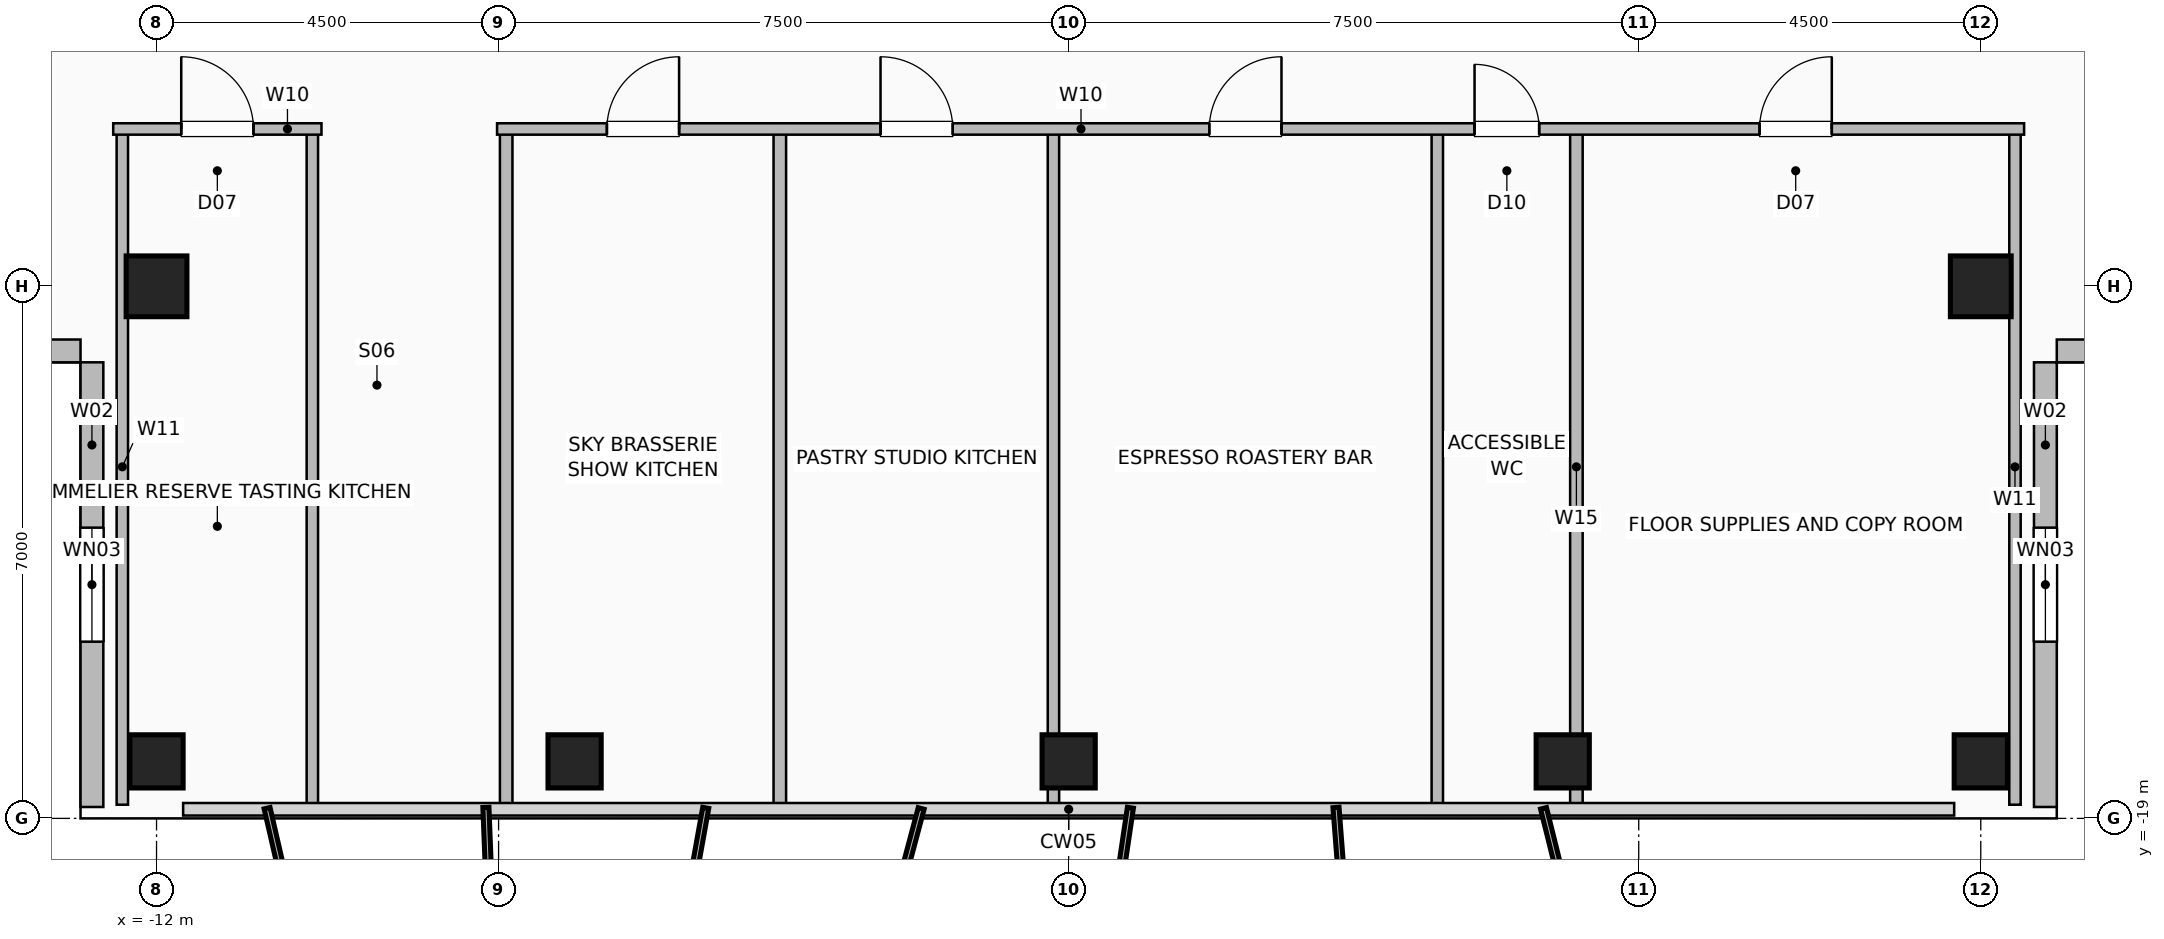
"""IFC4 building model, lengths in metres.
Left out: names, types, materials, properties, quantities, classifications, styles, units other than length and angle.
Written with IfcOpenShell. Run it as: python <this file> out.ifc"""

import sys

from ifc_helpers import new_model, si_unit, direction, frame, frame_2d, origin, origin_2d, place, context, subcontext, project, spatial, rectangle, hollow_rectangle, extrude, element, fill, save


model = new_model("IFC4")
c1 = context("Model", 3, precision=1e-05, world=origin(), true_north=direction((0.0, 1.0)))
c2 = subcontext(c1, "Body", "Model", "MODEL_VIEW")
j1 = project(units=[si_unit("LENGTHUNIT", "METRE"), si_unit("PLANEANGLEUNIT", "RADIAN")], contexts=[c1])
p1 = place(None, origin())
s1 = spatial("IfcSite", under=j1, at=p1, CompositionType="ELEMENT")
p2 = place(p1, origin())
s2 = spatial("IfcBuilding", under=s1, at=p2, CompositionType="ELEMENT")
p3 = place(p2, frame((0.0, 0.0, 293.6)))
s3 = spatial("IfcBuildingStorey", under=s2, at=p3, CompositionType="ELEMENT", Elevation=293.6)
for number, where, z_axis, x_axis in (
    (1, (-12.0, -18.25, 0.0), (0.0, 0.0, 1.0), (1.0, 0.0, 0.0)),
    (2, (-6.5, -18.25, 0.0), (0.0, 0.0, 1.0), (1.0, 0.0, 0.0)),
    (3, (0.0, -18.25, 0.0), (0.0, 0.0, 1.0), (1.0, 0.0, 0.0)),
    (4, (6.5, -18.25, 0.0), (0.0, 0.0, 1.0), (1.0, 0.0, 0.0)),
    (5, (12.0, -18.25, 0.0), (0.0, 0.0, 1.0), (1.0, 0.0, 0.0)),
):
    element("IfcColumn", number, at=place(p3, frame(where, z_axis=z_axis, x_axis=x_axis)), inside=s3, PredefinedType="COLUMN", context=c2, shape_type="SweptSolid", body=[
        extrude(hollow_rectangle(XDim=0.7, YDim=0.7, WallThickness=0.035, at=origin_2d()), origin(), (0.0, 0.0, 1.0), 3.6),
    ])
for number, where, z_axis, x_axis in (
    (6, (-12.0, -12.0, 0.0), (0.0, 0.0, 1.0), (1.0, 0.0, 0.0)),
    (7, (12.0, -12.0, 0.0), (0.0, 0.0, 1.0), (1.0, 0.0, 0.0)),
):
    element("IfcColumn", number, at=place(p3, frame(where, z_axis=z_axis, x_axis=x_axis)), inside=s3, PredefinedType="COLUMN", context=c2, shape_type="SweptSolid", body=[
        extrude(hollow_rectangle(XDim=0.8, YDim=0.8, WallThickness=0.04, at=origin_2d()), origin(), (0.0, 0.0, 1.0), 3.6),
    ])
p4 = place(p3, frame((-12.85, -18.85, 0.0), z_axis=(0.0, 0.0, 1.0), x_axis=(0.0, 1.0, 0.0)))
e8 = element("IfcWall", 8, at=p4, inside=s3, PredefinedType="SOLIDWALL", context=c2, shape_type="SweptSolid", body=[
    extrude(rectangle(XDim=5.85, YDim=0.3, at=frame_2d((2.925, 0.0))), origin(), (0.0, 0.0, 1.0), 3.36),
])
p5 = place(p4, frame((2.175, 0.0, 0.9)))
e9 = element("IfcOpeningElement", 9, at=p5, cuts=e8, PredefinedType="OPENING", context=c2, shape_type="SweptSolid", body=[
    extrude(rectangle(XDim=1.5, YDim=1.8, at=frame_2d((0.75, 0.9))), frame((0.0, 0.16, 0.0), z_axis=(0.0, -1.0, 0.0), x_axis=(1.0, 0.0, 0.0)), (0.0, 0.0, 1.0), 0.32),
])
p6 = place(p3, frame((-18.85, -12.85, 0.0), z_axis=(0.0, 0.0, 1.0), x_axis=(1.0, 0.0, 0.0)))
e10 = element("IfcWall", 10, at=p6, inside=s3, PredefinedType="SOLIDWALL", context=c2, shape_type="SweptSolid", body=[
    extrude(rectangle(XDim=5.85, YDim=0.3, at=frame_2d((2.925, 0.0))), origin(), (0.0, 0.0, 1.0), 3.36),
])
p7 = place(p3, frame((12.85, -18.85, 0.0), z_axis=(0.0, 0.0, 1.0), x_axis=(0.0, 1.0, 0.0)))
e11 = element("IfcWall", 11, at=p7, inside=s3, PredefinedType="SOLIDWALL", context=c2, shape_type="SweptSolid", body=[
    extrude(rectangle(XDim=5.85, YDim=0.3, at=frame_2d((2.925, 0.0))), origin(), (0.0, 0.0, 1.0), 3.36),
])
p8 = place(p7, frame((2.175, 0.0, 0.9)))
e12 = element("IfcOpeningElement", 12, at=p8, cuts=e11, PredefinedType="OPENING", context=c2, shape_type="SweptSolid", body=[
    extrude(rectangle(XDim=1.5, YDim=1.8, at=frame_2d((0.75, 0.9))), frame((0.0, 0.16, 0.0), z_axis=(0.0, -1.0, 0.0), x_axis=(1.0, 0.0, 0.0)), (0.0, 0.0, 1.0), 0.32),
])
p9 = place(p3, frame((18.85, -12.85, 0.0), z_axis=(0.0, 0.0, 1.0), x_axis=(-1.0, 0.0, 0.0)))
e13 = element("IfcWall", 13, at=p9, inside=s3, PredefinedType="SOLIDWALL", context=c2, shape_type="SweptSolid", body=[
    extrude(rectangle(XDim=5.85, YDim=0.3, at=frame_2d((2.925, 0.0))), origin(), (0.0, 0.0, 1.0), 3.36),
])
for number, where, z_axis, x_axis in (
    (14, (-12.45, -18.82, 0.0), (0.0, 0.0, 1.0), (0.0, 1.0, 0.0)),
    (15, (-9.95, -18.82, 0.0), (0.0, 0.0, 1.0), (0.0, 1.0, 0.0)),
):
    element("IfcWall", number, at=place(p3, frame(where, z_axis=z_axis, x_axis=x_axis)), inside=s3, PredefinedType="PARTITIONING", context=c2, shape_type="SweptSolid", body=[
        extrude(rectangle(XDim=8.89, YDim=0.15, at=frame_2d((4.445, 0.0))), origin(), (0.0, 0.0, 1.0), 3.36),
    ])
p10 = place(p3, frame((-12.57, -9.93, 0.0), z_axis=(0.0, 0.0, 1.0), x_axis=(1.0, 0.0, 0.0)))
e16 = element("IfcWall", 16, at=p10, inside=s3, PredefinedType="PARTITIONING", context=c2, shape_type="SweptSolid", body=[
    extrude(rectangle(XDim=2.74, YDim=0.15, at=frame_2d((1.37, 0.0))), origin(), (0.0, 0.0, 1.0), 3.36),
])
p11 = place(p10, frame((0.895, 0.0, 0.0)))
e17 = element("IfcOpeningElement", 17, at=p11, cuts=e16, PredefinedType="OPENING", context=c2, shape_type="SweptSolid", body=[
    extrude(rectangle(XDim=0.95, YDim=2.06, at=frame_2d((0.475, 1.03))), frame((0.0, 0.085, 0.0), z_axis=(0.0, -1.0, 0.0), x_axis=(1.0, 0.0, 0.0)), (0.0, 0.0, 1.0), 0.17),
])
for number, where, z_axis, x_axis in (
    (18, (6.68, -18.82, 0.0), (0.0, 0.0, 1.0), (0.0, 1.0, 0.0)),
    (19, (-7.4, -18.82, 0.0), (0.0, 0.0, 1.0), (0.0, 1.0, 0.0)),
    (20, (-3.8, -18.82, 0.0), (0.0, 0.0, 1.0), (0.0, 1.0, 0.0)),
):
    element("IfcWall", number, at=place(p3, frame(where, z_axis=z_axis, x_axis=x_axis)), inside=s3, PredefinedType="PLUMBINGWALL", context=c2, shape_type="SweptSolid", body=[
        extrude(rectangle(XDim=8.89, YDim=0.165, at=frame_2d((4.445, 0.0))), origin(), (0.0, 0.0, 1.0), 3.36),
    ])
p12 = place(p3, frame((-0.2, -18.82, 0.0), z_axis=(0.0, 0.0, 1.0), x_axis=(0.0, 1.0, 0.0)))
e21 = element("IfcWall", 21, at=p12, inside=s3, PredefinedType="PARTITIONING", context=c2, shape_type="SweptSolid", body=[
    extrude(rectangle(XDim=8.89, YDim=0.15, at=frame_2d((4.445, 0.0))), origin(), (0.0, 0.0, 1.0), 3.36),
])
p13 = place(p3, frame((4.85, -18.82, 0.0), z_axis=(0.0, 0.0, 1.0), x_axis=(0.0, 1.0, 0.0)))
e22 = element("IfcWall", 22, at=p13, inside=s3, PredefinedType="PARTITIONING", context=c2, shape_type="SweptSolid", body=[
    extrude(rectangle(XDim=8.89, YDim=0.15, at=frame_2d((4.445, 0.0))), origin(), (0.0, 0.0, 1.0), 2.977),
])
p14 = place(p3, frame((12.45, -18.82, 0.0), z_axis=(0.0, 0.0, 1.0), x_axis=(0.0, 1.0, 0.0)))
e23 = element("IfcWall", 23, at=p14, inside=s3, PredefinedType="PARTITIONING", context=c2, shape_type="SweptSolid", body=[
    extrude(rectangle(XDim=8.89, YDim=0.15, at=frame_2d((4.445, 0.0))), origin(), (0.0, 0.0, 1.0), 3.36),
])
p15 = place(p3, frame((-7.52, -9.93, 0.0), z_axis=(0.0, 0.0, 1.0), x_axis=(1.0, 0.0, 0.0)))
e24 = element("IfcWall", 24, at=p15, inside=s3, PredefinedType="PARTITIONING", context=c2, shape_type="SweptSolid", body=[
    extrude(rectangle(XDim=20.09, YDim=0.15, at=frame_2d((10.045, 0.0))), origin(), (0.0, 0.0, 1.0), 3.36),
])
p16 = place(p15, frame((1.445, 0.0, 0.0)))
e25 = element("IfcOpeningElement", 25, at=p16, cuts=e24, PredefinedType="OPENING", context=c2, shape_type="SweptSolid", body=[
    extrude(rectangle(XDim=0.95, YDim=2.06, at=frame_2d((0.475, 1.03))), frame((0.0, 0.085, 0.0), z_axis=(0.0, -1.0, 0.0), x_axis=(1.0, 0.0, 0.0)), (0.0, 0.0, 1.0), 0.17),
])
p17 = place(p15, frame((5.045, 0.0, 0.0)))
e26 = element("IfcOpeningElement", 26, at=p17, cuts=e24, PredefinedType="OPENING", context=c2, shape_type="SweptSolid", body=[
    extrude(rectangle(XDim=0.95, YDim=2.06, at=frame_2d((0.475, 1.03))), frame((0.0, 0.085, 0.0), z_axis=(0.0, -1.0, 0.0), x_axis=(1.0, 0.0, 0.0)), (0.0, 0.0, 1.0), 0.17),
])
p18 = place(p15, frame((9.37, 0.0, 0.0)))
e27 = element("IfcOpeningElement", 27, at=p18, cuts=e24, PredefinedType="OPENING", context=c2, shape_type="SweptSolid", body=[
    extrude(rectangle(XDim=0.95, YDim=2.06, at=frame_2d((0.475, 1.03))), frame((0.0, 0.085, 0.0), z_axis=(0.0, -1.0, 0.0), x_axis=(1.0, 0.0, 0.0)), (0.0, 0.0, 1.0), 0.17),
])
p19 = place(p15, frame((12.86, 0.0, 0.0)))
e28 = element("IfcOpeningElement", 28, at=p19, cuts=e24, PredefinedType="OPENING", context=c2, shape_type="SweptSolid", body=[
    extrude(rectangle(XDim=0.85, YDim=2.05, at=frame_2d((0.425, 1.025))), frame((0.0, 0.085, 0.0), z_axis=(0.0, -1.0, 0.0), x_axis=(1.0, 0.0, 0.0)), (0.0, 0.0, 1.0), 0.17),
])
p20 = place(p15, frame((16.61, 0.0, 0.0)))
e29 = element("IfcOpeningElement", 29, at=p20, cuts=e24, PredefinedType="OPENING", context=c2, shape_type="SweptSolid", body=[
    extrude(rectangle(XDim=0.95, YDim=2.06, at=frame_2d((0.475, 1.03))), frame((0.0, 0.085, 0.0), z_axis=(0.0, -1.0, 0.0), x_axis=(1.0, 0.0, 0.0)), (0.0, 0.0, 1.0), 0.17),
])
p21 = place(p5, origin())
e30 = element("IfcWindow", 30, at=p21, inside=s3, PartitioningType="SINGLE_PANEL", PredefinedType="WINDOW", context=c2, shape_type="SweptSolid", body=[
    extrude(rectangle(XDim=1.5, YDim=1.8, at=frame_2d((0.75, 0.9))), frame((0.0, 0.03, 0.0), z_axis=(0.0, -1.0, 0.0), x_axis=(1.0, 0.0, 0.0)), (0.0, 0.0, 1.0), 0.06),
])
fill(e9, e30)
p22 = place(p8, origin())
e31 = element("IfcWindow", 31, at=p22, inside=s3, PartitioningType="SINGLE_PANEL", PredefinedType="WINDOW", context=c2, shape_type="SweptSolid", body=[
    extrude(rectangle(XDim=1.5, YDim=1.8, at=frame_2d((0.75, 0.9))), frame((0.0, 0.03, 0.0), z_axis=(0.0, -1.0, 0.0), x_axis=(1.0, 0.0, 0.0)), (0.0, 0.0, 1.0), 0.06),
])
fill(e12, e31)
p23 = place(p11, origin())
e32 = element("IfcDoor", 32, at=p23, inside=s3, OperationType="SINGLE_SWING_LEFT", PredefinedType="DOOR", context=c2, shape_type="SweptSolid", body=[
    extrude(rectangle(XDim=0.95, YDim=2.06, at=frame_2d((0.475, 1.03))), frame((0.0, 0.025, 0.0), z_axis=(0.0, -1.0, 0.0), x_axis=(1.0, 0.0, 0.0)), (0.0, 0.0, 1.0), 0.05),
])
fill(e17, e32)
p24 = place(p16, origin())
e33 = element("IfcDoor", 33, at=p24, inside=s3, OperationType="SINGLE_SWING_RIGHT", PredefinedType="DOOR", context=c2, shape_type="SweptSolid", body=[
    extrude(rectangle(XDim=0.95, YDim=2.06, at=frame_2d((0.475, 1.03))), frame((0.0, 0.025, 0.0), z_axis=(0.0, -1.0, 0.0), x_axis=(1.0, 0.0, 0.0)), (0.0, 0.0, 1.0), 0.05),
])
fill(e25, e33)
p25 = place(p17, origin())
e34 = element("IfcDoor", 34, at=p25, inside=s3, OperationType="SINGLE_SWING_LEFT", PredefinedType="DOOR", context=c2, shape_type="SweptSolid", body=[
    extrude(rectangle(XDim=0.95, YDim=2.06, at=frame_2d((0.475, 1.03))), frame((0.0, 0.025, 0.0), z_axis=(0.0, -1.0, 0.0), x_axis=(1.0, 0.0, 0.0)), (0.0, 0.0, 1.0), 0.05),
])
fill(e26, e34)
p26 = place(p18, origin())
e35 = element("IfcDoor", 35, at=p26, inside=s3, OperationType="SINGLE_SWING_RIGHT", PredefinedType="DOOR", context=c2, shape_type="SweptSolid", body=[
    extrude(rectangle(XDim=0.95, YDim=2.06, at=frame_2d((0.475, 1.03))), frame((0.0, 0.025, 0.0), z_axis=(0.0, -1.0, 0.0), x_axis=(1.0, 0.0, 0.0)), (0.0, 0.0, 1.0), 0.05),
])
fill(e27, e35)
p27 = place(p19, origin())
e36 = element("IfcDoor", 36, at=p27, inside=s3, OperationType="SINGLE_SWING_LEFT", PredefinedType="DOOR", context=c2, shape_type="SweptSolid", body=[
    extrude(rectangle(XDim=0.85, YDim=2.05, at=frame_2d((0.425, 1.025))), frame((0.0, 0.025, 0.0), z_axis=(0.0, -1.0, 0.0), x_axis=(1.0, 0.0, 0.0)), (0.0, 0.0, 1.0), 0.05),
])
fill(e28, e36)
p28 = place(p20, origin())
e37 = element("IfcDoor", 37, at=p28, inside=s3, OperationType="SINGLE_SWING_RIGHT", PredefinedType="DOOR", context=c2, shape_type="SweptSolid", body=[
    extrude(rectangle(XDim=0.95, YDim=2.06, at=frame_2d((0.475, 1.03))), frame((0.0, 0.025, 0.0), z_axis=(0.0, -1.0, 0.0), x_axis=(1.0, 0.0, 0.0)), (0.0, 0.0, 1.0), 0.05),
])
fill(e29, e37)
save(model, sys.argv[1])
